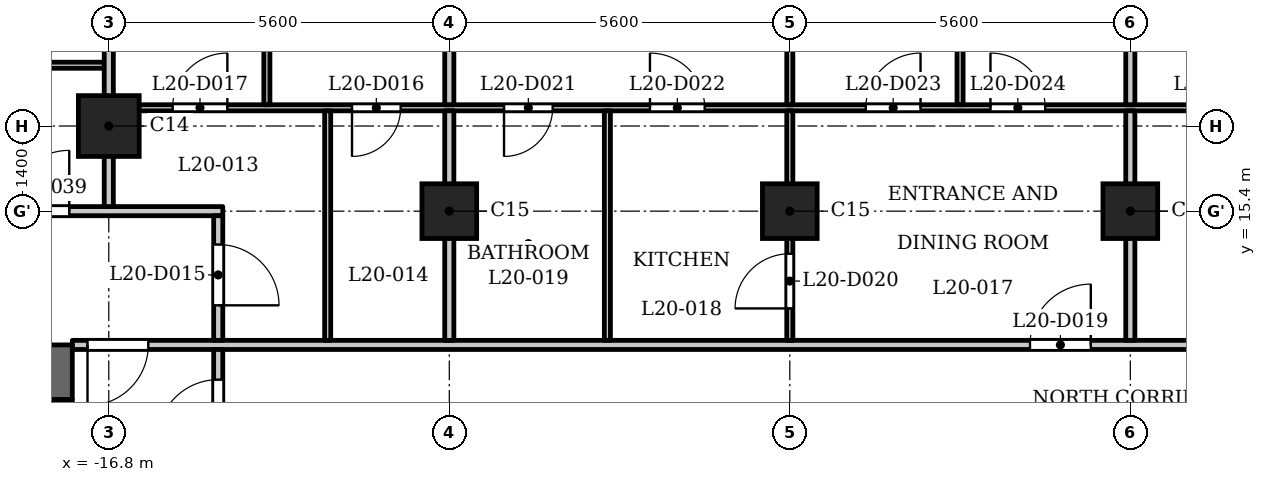
"""IFC4 building model, lengths in metres.
Left out: names, types, materials, properties, quantities, classifications, styles, units other than length and angle.
Written with IfcOpenShell. Run it as: python <this file> out.ifc"""

import sys

from ifc_helpers import new_model, si_unit, direction, frame, frame_2d, origin, origin_2d, place, context, subcontext, project, spatial, rectangle, extrude, element, fill, save


model = new_model("IFC4")
c1 = context("Model", 3, precision=1e-05, world=origin(), true_north=direction((0.0, 1.0)))
c2 = subcontext(c1, "Body", "Model", "MODEL_VIEW")
j1 = project(units=[si_unit("LENGTHUNIT", "METRE"), si_unit("PLANEANGLEUNIT", "RADIAN")], contexts=[c1])
p1 = place(None, origin())
s1 = spatial("IfcSite", under=j1, at=p1, CompositionType="ELEMENT")
p2 = place(p1, origin())
s2 = spatial("IfcBuilding", under=s1, at=p2, CompositionType="ELEMENT")
p3 = place(p2, frame((0.0, 0.0, 83.3)))
s3 = spatial("IfcBuildingStorey", under=s2, at=p3, CompositionType="ELEMENT", Elevation=83.3)
p4 = place(p3, frame((-16.8, 16.8, 0.0), z_axis=(0.0, 0.0, 1.0), x_axis=(1.0, 0.0, 0.0)))
e1 = element("IfcColumn", 1, at=p4, inside=s3, PredefinedType="COLUMN", context=c2, shape_type="SweptSolid", body=[
    extrude(rectangle(XDim=1.0, YDim=1.0, at=origin_2d()), origin(), (0.0, 0.0, 1.0), 3.5),
])
for number, where, z_axis, x_axis in (
    (2, (-11.2, 15.4, 0.0), (0.0, 0.0, 1.0), (1.0, 0.0, 0.0)),
    (3, (-5.6, 15.4, 0.0), (0.0, 0.0, 1.0), (1.0, 0.0, 0.0)),
    (4, (0.0, 15.4, 0.0), (0.0, 0.0, 1.0), (1.0, 0.0, 0.0)),
):
    element("IfcColumn", number, at=place(p3, frame(where, z_axis=z_axis, x_axis=x_axis)), inside=s3, PredefinedType="COLUMN", context=c2, shape_type="SweptSolid", body=[
        extrude(rectangle(XDim=0.9, YDim=0.9, at=origin_2d()), origin(), (0.0, 0.0, 1.0), 3.5),
    ])
p5 = place(p3, frame((-17.4, 12.75, 0.0), z_axis=(0.0, 0.0, 1.0), x_axis=(-1.0, 0.0, 0.0)))
e5 = element("IfcWall", 5, at=p5, inside=s3, PredefinedType="SHEAR", context=c2, shape_type="SweptSolid", body=[
    extrude(rectangle(XDim=10.4, YDim=0.9, at=frame_2d((5.2, 0.0))), origin(), (0.0, 0.0, 1.0), 3.2),
])
p6 = place(p3, frame((-17.6, -12.3, 0.0), z_axis=(0.0, 0.0, 1.0), x_axis=(0.0, 1.0, 0.0)))
e6 = element("IfcWall", 6, at=p6, inside=s3, PredefinedType="SHEAR", context=c2, shape_type="SweptSolid", body=[
    extrude(rectangle(XDim=24.6, YDim=0.4, at=frame_2d((12.3, 0.0))), origin(), (0.0, 0.0, 1.0), 3.2),
])
p7 = place(p6, frame((6.0, 0.0, 0.0)))
e7 = element("IfcOpeningElement", 7, at=p7, cuts=e6, PredefinedType="OPENING", context=c2, shape_type="SweptSolid", body=[
    extrude(rectangle(XDim=1.1, YDim=2.1, at=frame_2d((0.55, 1.05))), frame((0.0, 0.21, 0.0), z_axis=(0.0, -1.0, 0.0), x_axis=(1.0, 0.0, 0.0)), (0.0, 0.0, 1.0), 0.42),
])
p8 = place(p6, frame((8.4, 0.0, 0.0)))
e8 = element("IfcOpeningElement", 8, at=p8, cuts=e6, PredefinedType="OPENING", context=c2, shape_type="SweptSolid", body=[
    extrude(rectangle(XDim=1.1, YDim=2.1, at=frame_2d((0.55, 1.05))), frame((0.0, 0.21, 0.0), z_axis=(0.0, -1.0, 0.0), x_axis=(1.0, 0.0, 0.0)), (0.0, 0.0, 1.0), 0.42),
])
p9 = place(p6, frame((10.8, 0.0, 0.0)))
e9 = element("IfcOpeningElement", 9, at=p9, cuts=e6, PredefinedType="OPENING", context=c2, shape_type="SweptSolid", body=[
    extrude(rectangle(XDim=1.1, YDim=2.1, at=frame_2d((0.55, 1.05))), frame((0.0, 0.21, 0.0), z_axis=(0.0, -1.0, 0.0), x_axis=(1.0, 0.0, 0.0)), (0.0, 0.0, 1.0), 0.42),
])
p10 = place(p6, frame((16.75, 0.0, 0.0)))
e10 = element("IfcOpeningElement", 10, at=p10, cuts=e6, PredefinedType="OPENING", context=c2, shape_type="SweptSolid", body=[
    extrude(rectangle(XDim=0.9, YDim=2.1, at=frame_2d((0.45, 1.05))), frame((0.0, 0.21, 0.0), z_axis=(0.0, -1.0, 0.0), x_axis=(1.0, 0.0, 0.0)), (0.0, 0.0, 1.0), 0.42),
])
p11 = place(p6, frame((22.8, 0.0, 0.0)))
e11 = element("IfcOpeningElement", 11, at=p11, cuts=e6, PredefinedType="OPENING", context=c2, shape_type="SweptSolid", body=[
    extrude(rectangle(XDim=1.1, YDim=2.1, at=frame_2d((0.55, 1.05))), frame((0.0, 0.21, 0.0), z_axis=(0.0, -1.0, 0.0), x_axis=(1.0, 0.0, 0.0)), (0.0, 0.0, 1.0), 0.42),
])
p12 = place(p6, frame((0.7, 0.0, 0.0)))
e12 = element("IfcOpeningElement", 12, at=p12, cuts=e6, PredefinedType="OPENING", context=c2, shape_type="SweptSolid", body=[
    extrude(rectangle(XDim=1.1, YDim=2.1, at=frame_2d((0.55, 1.05))), frame((0.0, 0.21, 0.0), z_axis=(0.0, -1.0, 0.0), x_axis=(1.0, 0.0, 0.0)), (0.0, 0.0, 1.0), 0.42),
])
p13 = place(p6, frame((12.775, 0.0, 0.0)))
e13 = element("IfcOpeningElement", 13, at=p13, cuts=e6, PredefinedType="OPENING", context=c2, shape_type="SweptSolid", body=[
    extrude(rectangle(XDim=1.8, YDim=2.1, at=frame_2d((0.9, 1.05))), frame((0.0, 0.21, 0.0), z_axis=(0.0, -1.0, 0.0), x_axis=(1.0, 0.0, 0.0)), (0.0, 0.0, 1.0), 0.42),
])
p14 = place(p3, frame((-17.4, 13.2, 0.0), z_axis=(0.0, 0.0, 1.0), x_axis=(1.0, 0.0, 0.0)))
e14 = element("IfcWall", 14, at=p14, inside=s3, PredefinedType="PARTITIONING", context=c2, shape_type="SweptSolid", body=[
    extrude(rectangle(XDim=34.8, YDim=0.15, at=frame_2d((17.4, 0.0))), origin(), (0.0, 0.0, 1.0), 3.2),
])
p15 = place(p14, frame((0.25, 0.0, 0.0)))
e15 = element("IfcOpeningElement", 15, at=p15, cuts=e14, PredefinedType="OPENING", context=c2, shape_type="SweptSolid", body=[
    extrude(rectangle(XDim=1.0, YDim=2.1, at=frame_2d((0.5, 1.05))), frame((0.0, 0.085, 0.0), z_axis=(0.0, -1.0, 0.0), x_axis=(1.0, 0.0, 0.0)), (0.0, 0.0, 1.0), 0.17),
])
p16 = place(p14, frame((33.65, 0.0, 0.0)))
e16 = element("IfcOpeningElement", 16, at=p16, cuts=e14, PredefinedType="OPENING", context=c2, shape_type="SweptSolid", body=[
    extrude(rectangle(XDim=1.0, YDim=2.1, at=frame_2d((0.5, 1.05))), frame((0.0, 0.085, 0.0), z_axis=(0.0, -1.0, 0.0), x_axis=(1.0, 0.0, 0.0)), (0.0, 0.0, 1.0), 0.17),
])
p17 = place(p14, frame((15.75, 0.0, 0.0)))
e17 = element("IfcOpeningElement", 17, at=p17, cuts=e14, PredefinedType="OPENING", context=c2, shape_type="SweptSolid", body=[
    extrude(rectangle(XDim=1.0, YDim=2.1, at=frame_2d((0.5, 1.05))), frame((0.0, 0.085, 0.0), z_axis=(0.0, -1.0, 0.0), x_axis=(1.0, 0.0, 0.0)), (0.0, 0.0, 1.0), 0.17),
])
p18 = place(p14, frame((21.35, 0.0, 0.0)))
e18 = element("IfcOpeningElement", 18, at=p18, cuts=e14, PredefinedType="OPENING", context=c2, shape_type="SweptSolid", body=[
    extrude(rectangle(XDim=1.0, YDim=2.1, at=frame_2d((0.5, 1.05))), frame((0.0, 0.085, 0.0), z_axis=(0.0, -1.0, 0.0), x_axis=(1.0, 0.0, 0.0)), (0.0, 0.0, 1.0), 0.17),
])
p19 = place(p3, frame((-27.484, 15.4, 0.0), z_axis=(0.0, 0.0, 1.0), x_axis=(1.0, 0.0, 0.0)))
e19 = element("IfcWall", 19, at=p19, inside=s3, PredefinedType="PARTITIONING", context=c2, shape_type="SweptSolid", body=[
    extrude(rectangle(XDim=12.559, YDim=0.15, at=frame_2d((6.279, 0.0))), origin(), (0.0, 0.0, 1.0), 3.2),
])
p20 = place(p19, frame((9.034, 0.0, 0.0)))
e20 = element("IfcOpeningElement", 20, at=p20, cuts=e19, PredefinedType="OPENING", context=c2, shape_type="SweptSolid", body=[
    extrude(rectangle(XDim=1.0, YDim=2.1, at=frame_2d((0.5, 1.05))), frame((0.0, 0.085, 0.0), z_axis=(0.0, -1.0, 0.0), x_axis=(1.0, 0.0, 0.0)), (0.0, 0.0, 1.0), 0.17),
])
p21 = place(p3, frame((-16.725, 17.1, 0.0), z_axis=(0.0, 0.0, 1.0), x_axis=(1.0, 0.0, 0.0)))
e21 = element("IfcWall", 21, at=p21, inside=s3, PredefinedType="PARTITIONING", context=c2, shape_type="SweptSolid", body=[
    extrude(rectangle(XDim=33.45, YDim=0.1, at=frame_2d((16.725, 0.0))), origin(), (0.0, 0.0, 1.0), 3.2),
])
p22 = place(p21, frame((3.925, 0.0, 0.0)))
e22 = element("IfcOpeningElement", 22, at=p22, cuts=e21, PredefinedType="OPENING", context=c2, shape_type="SweptSolid", body=[
    extrude(rectangle(XDim=0.8, YDim=2.1, at=frame_2d((0.4, 1.05))), frame((0.0, 0.06, 0.0), z_axis=(0.0, -1.0, 0.0), x_axis=(1.0, 0.0, 0.0)), (0.0, 0.0, 1.0), 0.12),
])
p23 = place(p21, frame((0.975, 0.0, 0.0)))
e23 = element("IfcOpeningElement", 23, at=p23, cuts=e21, PredefinedType="OPENING", context=c2, shape_type="SweptSolid", body=[
    extrude(rectangle(XDim=0.9, YDim=2.1, at=frame_2d((0.45, 1.05))), frame((0.0, 0.06, 0.0), z_axis=(0.0, -1.0, 0.0), x_axis=(1.0, 0.0, 0.0)), (0.0, 0.0, 1.0), 0.12),
])
p24 = place(p21, frame((6.425, 0.0, 0.0)))
e24 = element("IfcOpeningElement", 24, at=p24, cuts=e21, PredefinedType="OPENING", context=c2, shape_type="SweptSolid", body=[
    extrude(rectangle(XDim=0.8, YDim=2.1, at=frame_2d((0.4, 1.05))), frame((0.0, 0.06, 0.0), z_axis=(0.0, -1.0, 0.0), x_axis=(1.0, 0.0, 0.0)), (0.0, 0.0, 1.0), 0.12),
])
p25 = place(p21, frame((8.825, 0.0, 0.0)))
e25 = element("IfcOpeningElement", 25, at=p25, cuts=e21, PredefinedType="OPENING", context=c2, shape_type="SweptSolid", body=[
    extrude(rectangle(XDim=0.9, YDim=2.1, at=frame_2d((0.45, 1.05))), frame((0.0, 0.06, 0.0), z_axis=(0.0, -1.0, 0.0), x_axis=(1.0, 0.0, 0.0)), (0.0, 0.0, 1.0), 0.12),
])
p26 = place(p21, frame((12.375, 0.0, 0.0)))
e26 = element("IfcOpeningElement", 26, at=p26, cuts=e21, PredefinedType="OPENING", context=c2, shape_type="SweptSolid", body=[
    extrude(rectangle(XDim=0.9, YDim=2.1, at=frame_2d((0.45, 1.05))), frame((0.0, 0.06, 0.0), z_axis=(0.0, -1.0, 0.0), x_axis=(1.0, 0.0, 0.0)), (0.0, 0.0, 1.0), 0.12),
])
p27 = place(p21, frame((14.425, 0.0, 0.0)))
e27 = element("IfcOpeningElement", 27, at=p27, cuts=e21, PredefinedType="OPENING", context=c2, shape_type="SweptSolid", body=[
    extrude(rectangle(XDim=0.9, YDim=2.1, at=frame_2d((0.45, 1.05))), frame((0.0, 0.06, 0.0), z_axis=(0.0, -1.0, 0.0), x_axis=(1.0, 0.0, 0.0)), (0.0, 0.0, 1.0), 0.12),
])
p28 = place(p21, frame((26.225, 0.0, 0.0)))
e28 = element("IfcOpeningElement", 28, at=p28, cuts=e21, PredefinedType="OPENING", context=c2, shape_type="SweptSolid", body=[
    extrude(rectangle(XDim=0.8, YDim=2.1, at=frame_2d((0.4, 1.05))), frame((0.0, 0.06, 0.0), z_axis=(0.0, -1.0, 0.0), x_axis=(1.0, 0.0, 0.0)), (0.0, 0.0, 1.0), 0.12),
])
p29 = place(p21, frame((23.025, 0.0, 0.0)))
e29 = element("IfcOpeningElement", 29, at=p29, cuts=e21, PredefinedType="OPENING", context=c2, shape_type="SweptSolid", body=[
    extrude(rectangle(XDim=0.9, YDim=2.1, at=frame_2d((0.45, 1.05))), frame((0.0, 0.06, 0.0), z_axis=(0.0, -1.0, 0.0), x_axis=(1.0, 0.0, 0.0)), (0.0, 0.0, 1.0), 0.12),
])
p30 = place(p21, frame((17.775, 0.0, 0.0)))
e30 = element("IfcOpeningElement", 30, at=p30, cuts=e21, PredefinedType="OPENING", context=c2, shape_type="SweptSolid", body=[
    extrude(rectangle(XDim=0.9, YDim=2.1, at=frame_2d((0.45, 1.05))), frame((0.0, 0.06, 0.0), z_axis=(0.0, -1.0, 0.0), x_axis=(1.0, 0.0, 0.0)), (0.0, 0.0, 1.0), 0.12),
])
p31 = place(p21, frame((20.025, 0.0, 0.0)))
e31 = element("IfcOpeningElement", 31, at=p31, cuts=e21, PredefinedType="OPENING", context=c2, shape_type="SweptSolid", body=[
    extrude(rectangle(XDim=0.9, YDim=2.1, at=frame_2d((0.45, 1.05))), frame((0.0, 0.06, 0.0), z_axis=(0.0, -1.0, 0.0), x_axis=(1.0, 0.0, 0.0)), (0.0, 0.0, 1.0), 0.12),
])
p32 = place(p21, frame((28.825, 0.0, 0.0)))
e32 = element("IfcOpeningElement", 32, at=p32, cuts=e21, PredefinedType="OPENING", context=c2, shape_type="SweptSolid", body=[
    extrude(rectangle(XDim=0.8, YDim=2.1, at=frame_2d((0.4, 1.05))), frame((0.0, 0.06, 0.0), z_axis=(0.0, -1.0, 0.0), x_axis=(1.0, 0.0, 0.0)), (0.0, 0.0, 1.0), 0.12),
])
p33 = place(p21, frame((31.975, 0.0, 0.0)))
e33 = element("IfcOpeningElement", 33, at=p33, cuts=e21, PredefinedType="OPENING", context=c2, shape_type="SweptSolid", body=[
    extrude(rectangle(XDim=0.9, YDim=2.1, at=frame_2d((0.45, 1.05))), frame((0.0, 0.06, 0.0), z_axis=(0.0, -1.0, 0.0), x_axis=(1.0, 0.0, 0.0)), (0.0, 0.0, 1.0), 0.12),
])
p34 = place(p3, frame((-26.554, 17.8, 0.0), z_axis=(0.0, 0.0, 1.0), x_axis=(1.0, 0.0, 0.0)))
e34 = element("IfcWall", 34, at=p34, inside=s3, PredefinedType="PARTITIONING", context=c2, shape_type="SweptSolid", body=[
    extrude(rectangle(XDim=9.679, YDim=0.1, at=frame_2d((4.84, 0.0))), origin(), (0.0, 0.0, 1.0), 3.2),
])
p35 = place(p34, frame((2.786, 0.0, 0.0)))
e35 = element("IfcOpeningElement", 35, at=p35, cuts=e34, PredefinedType="OPENING", context=c2, shape_type="SweptSolid", body=[
    extrude(rectangle(XDim=0.8, YDim=2.1, at=frame_2d((0.4, 1.05))), frame((0.0, 0.06, 0.0), z_axis=(0.0, -1.0, 0.0), x_axis=(1.0, 0.0, 0.0)), (0.0, 0.0, 1.0), 0.12),
])
p36 = place(p34, frame((7.204, 0.0, 0.0)))
e36 = element("IfcOpeningElement", 36, at=p36, cuts=e34, PredefinedType="OPENING", context=c2, shape_type="SweptSolid", body=[
    extrude(rectangle(XDim=0.9, YDim=2.1, at=frame_2d((0.45, 1.05))), frame((0.0, 0.06, 0.0), z_axis=(0.0, -1.0, 0.0), x_axis=(1.0, 0.0, 0.0)), (0.0, 0.0, 1.0), 0.12),
])
p37 = place(p3, frame((-16.8, 15.475, 0.0), z_axis=(0.0, 0.0, 1.0), x_axis=(0.0, 1.0, 0.0)))
e37 = element("IfcWall", 37, at=p37, inside=s3, PredefinedType="PARTITIONING", context=c2, shape_type="SweptSolid", body=[
    extrude(rectangle(XDim=7.555, YDim=0.15, at=frame_2d((3.777, 0.0))), origin(), (0.0, 0.0, 1.0), 3.2),
])
p38 = place(p3, frame((-15.0, 6.769, 0.0), z_axis=(0.0, 0.0, 1.0), x_axis=(0.0, 1.0, 0.0)))
e38 = element("IfcWall", 38, at=p38, inside=s3, PredefinedType="PARTITIONING", context=c2, shape_type="SweptSolid", body=[
    extrude(rectangle(XDim=6.356, YDim=0.15, at=frame_2d((3.178, 0.0))), origin(), (0.0, 0.0, 1.0), 3.2),
])
p39 = place(p38, frame((4.86, 0.0, 0.0)))
e39 = element("IfcOpeningElement", 39, at=p39, cuts=e38, PredefinedType="OPENING", context=c2, shape_type="SweptSolid", body=[
    extrude(rectangle(XDim=1.0, YDim=2.1, at=frame_2d((0.5, 1.05))), frame((0.0, 0.085, 0.0), z_axis=(0.0, -1.0, 0.0), x_axis=(1.0, 0.0, 0.0)), (0.0, 0.0, 1.0), 0.17),
])
p40 = place(p3, frame((-15.0, 13.275, 0.0), z_axis=(0.0, 0.0, 1.0), x_axis=(0.0, 1.0, 0.0)))
e40 = element("IfcWall", 40, at=p40, inside=s3, PredefinedType="PARTITIONING", context=c2, shape_type="SweptSolid", body=[
    extrude(rectangle(XDim=2.05, YDim=0.15, at=frame_2d((1.025, 0.0))), origin(), (0.0, 0.0, 1.0), 3.2),
])
p41 = place(p40, frame((0.576, 0.0, 0.0)))
e41 = element("IfcOpeningElement", 41, at=p41, cuts=e40, PredefinedType="OPENING", context=c2, shape_type="SweptSolid", body=[
    extrude(rectangle(XDim=1.0, YDim=2.1, at=frame_2d((0.5, 1.05))), frame((0.0, 0.085, 0.0), z_axis=(0.0, -1.0, 0.0), x_axis=(1.0, 0.0, 0.0)), (0.0, 0.0, 1.0), 0.17),
])
p42 = place(p3, frame((-14.2, 17.15, 0.0), z_axis=(0.0, 0.0, 1.0), x_axis=(0.0, 1.0, 0.0)))
e42 = element("IfcWall", 42, at=p42, inside=s3, PredefinedType="PARTITIONING", context=c2, shape_type="SweptSolid", body=[
    extrude(rectangle(XDim=4.93, YDim=0.1, at=frame_2d((2.465, 0.0))), origin(), (0.0, 0.0, 1.0), 3.2),
])
p43 = place(p42, frame((3.6, 0.0, 0.0)))
e43 = element("IfcOpeningElement", 43, at=p43, cuts=e42, PredefinedType="OPENING", context=c2, shape_type="SweptSolid", body=[
    extrude(rectangle(XDim=0.9, YDim=2.1, at=frame_2d((0.45, 1.05))), frame((0.0, 0.06, 0.0), z_axis=(0.0, -1.0, 0.0), x_axis=(1.0, 0.0, 0.0)), (0.0, 0.0, 1.0), 0.12),
])
p44 = place(p3, frame((-13.2, 13.275, 0.0), z_axis=(0.0, 0.0, 1.0), x_axis=(0.0, 1.0, 0.0)))
e44 = element("IfcWall", 44, at=p44, inside=s3, PredefinedType="PARTITIONING", context=c2, shape_type="SweptSolid", body=[
    extrude(rectangle(XDim=3.775, YDim=0.1, at=frame_2d((1.888, 0.0))), origin(), (0.0, 0.0, 1.0), 3.2),
])
p45 = place(p3, frame((-11.2, 13.275, 0.0), z_axis=(0.0, 0.0, 1.0), x_axis=(0.0, 1.0, 0.0)))
e45 = element("IfcWall", 45, at=p45, inside=s3, PredefinedType="PARTITIONING", context=c2, shape_type="SweptSolid", body=[
    extrude(rectangle(XDim=3.775, YDim=0.15, at=frame_2d((1.888, 0.0))), origin(), (0.0, 0.0, 1.0), 3.2),
])
p46 = place(p3, frame((-11.2, 17.15, 0.0), z_axis=(0.0, 0.0, 1.0), x_axis=(0.0, 1.0, 0.0)))
e46 = element("IfcWall", 46, at=p46, inside=s3, PredefinedType="PARTITIONING", context=c2, shape_type="SweptSolid", body=[
    extrude(rectangle(XDim=5.88, YDim=0.15, at=frame_2d((2.94, 0.0))), origin(), (0.0, 0.0, 1.0), 3.2),
])
p47 = place(p3, frame((-8.6, 13.275, 0.0), z_axis=(0.0, 0.0, 1.0), x_axis=(0.0, 1.0, 0.0)))
e47 = element("IfcWall", 47, at=p47, inside=s3, PredefinedType="PARTITIONING", context=c2, shape_type="SweptSolid", body=[
    extrude(rectangle(XDim=3.775, YDim=0.1, at=frame_2d((1.888, 0.0))), origin(), (0.0, 0.0, 1.0), 3.2),
])
p48 = place(p3, frame((-5.6, 13.275, 0.0), z_axis=(0.0, 0.0, 1.0), x_axis=(0.0, 1.0, 0.0)))
e48 = element("IfcWall", 48, at=p48, inside=s3, PredefinedType="PARTITIONING", context=c2, shape_type="SweptSolid", body=[
    extrude(rectangle(XDim=3.775, YDim=0.1, at=frame_2d((1.888, 0.0))), origin(), (0.0, 0.0, 1.0), 3.2),
])
p49 = place(p48, frame((0.525, 0.0, 0.0)))
e49 = element("IfcOpeningElement", 49, at=p49, cuts=e48, PredefinedType="OPENING", context=c2, shape_type="SweptSolid", body=[
    extrude(rectangle(XDim=0.9, YDim=2.1, at=frame_2d((0.45, 1.05))), frame((0.0, 0.06, 0.0), z_axis=(0.0, -1.0, 0.0), x_axis=(1.0, 0.0, 0.0)), (0.0, 0.0, 1.0), 0.12),
])
p50 = place(p3, frame((-5.6, 17.15, 0.0), z_axis=(0.0, 0.0, 1.0), x_axis=(0.0, 1.0, 0.0)))
e50 = element("IfcWall", 50, at=p50, inside=s3, PredefinedType="PARTITIONING", context=c2, shape_type="SweptSolid", body=[
    extrude(rectangle(XDim=5.88, YDim=0.1, at=frame_2d((2.94, 0.0))), origin(), (0.0, 0.0, 1.0), 3.2),
])
p51 = place(p3, frame((-2.8, 17.15, 0.0), z_axis=(0.0, 0.0, 1.0), x_axis=(0.0, 1.0, 0.0)))
e51 = element("IfcWall", 51, at=p51, inside=s3, PredefinedType="PARTITIONING", context=c2, shape_type="SweptSolid", body=[
    extrude(rectangle(XDim=4.93, YDim=0.1, at=frame_2d((2.465, 0.0))), origin(), (0.0, 0.0, 1.0), 3.2),
])
p52 = place(p3, frame((0.0, 13.275, 0.0), z_axis=(0.0, 0.0, 1.0), x_axis=(0.0, 1.0, 0.0)))
e52 = element("IfcWall", 52, at=p52, inside=s3, PredefinedType="PARTITIONING", context=c2, shape_type="SweptSolid", body=[
    extrude(rectangle(XDim=3.775, YDim=0.15, at=frame_2d((1.888, 0.0))), origin(), (0.0, 0.0, 1.0), 3.2),
])
p53 = place(p3, frame((0.0, 17.15, 0.0), z_axis=(0.0, 0.0, 1.0), x_axis=(0.0, 1.0, 0.0)))
e53 = element("IfcWall", 53, at=p53, inside=s3, PredefinedType="PARTITIONING", context=c2, shape_type="SweptSolid", body=[
    extrude(rectangle(XDim=5.88, YDim=0.15, at=frame_2d((2.94, 0.0))), origin(), (0.0, 0.0, 1.0), 3.2),
])
p54 = place(p39, origin())
e54 = element("IfcDoor", 54, at=p54, inside=s3, OperationType="SINGLE_SWING_RIGHT", PredefinedType="DOOR", context=c2, shape_type="SweptSolid", body=[
    extrude(rectangle(XDim=1.0, YDim=2.1, at=frame_2d((0.5, 1.05))), frame((0.0, 0.025, 0.0), z_axis=(0.0, -1.0, 0.0), x_axis=(1.0, 0.0, 0.0)), (0.0, 0.0, 1.0), 0.05),
])
fill(e39, e54)
p55 = place(p15, origin())
e55 = element("IfcDoor", 55, at=p55, inside=s3, OperationType="SINGLE_SWING_LEFT", PredefinedType="DOOR", context=c2, shape_type="SweptSolid", body=[
    extrude(rectangle(XDim=1.0, YDim=2.1, at=frame_2d((0.5, 1.05))), frame((0.0, 0.025, 0.0), z_axis=(0.0, -1.0, 0.0), x_axis=(1.0, 0.0, 0.0)), (0.0, 0.0, 1.0), 0.05),
])
fill(e15, e55)
p56 = place(p41, origin())
e56 = element("IfcDoor", 56, at=p56, inside=s3, OperationType="SINGLE_SWING_LEFT", PredefinedType="DOOR", context=c2, shape_type="SweptSolid", body=[
    extrude(rectangle(XDim=1.0, YDim=2.1, at=frame_2d((0.5, 1.05))), frame((0.0, 0.025, 0.0), z_axis=(0.0, -1.0, 0.0), x_axis=(1.0, 0.0, 0.0)), (0.0, 0.0, 1.0), 0.05),
])
fill(e41, e56)
p57 = place(p22, origin())
e57 = element("IfcDoor", 57, at=p57, inside=s3, OperationType="SINGLE_SWING_LEFT", PredefinedType="DOOR", context=c2, shape_type="SweptSolid", body=[
    extrude(rectangle(XDim=0.8, YDim=2.1, at=frame_2d((0.4, 1.05))), frame((0.0, 0.025, 0.0), z_axis=(0.0, -1.0, 0.0), x_axis=(1.0, 0.0, 0.0)), (0.0, 0.0, 1.0), 0.05),
])
fill(e22, e57)
p58 = place(p23, origin())
e58 = element("IfcDoor", 58, at=p58, inside=s3, OperationType="SINGLE_SWING_LEFT", PredefinedType="DOOR", context=c2, shape_type="SweptSolid", body=[
    extrude(rectangle(XDim=0.9, YDim=2.1, at=frame_2d((0.45, 1.05))), frame((0.0, 0.025, 0.0), z_axis=(0.0, -1.0, 0.0), x_axis=(1.0, 0.0, 0.0)), (0.0, 0.0, 1.0), 0.05),
])
fill(e23, e58)
p59 = place(p17, origin())
e59 = element("IfcDoor", 59, at=p59, inside=s3, OperationType="SINGLE_SWING_LEFT", PredefinedType="DOOR", context=c2, shape_type="SweptSolid", body=[
    extrude(rectangle(XDim=1.0, YDim=2.1, at=frame_2d((0.5, 1.05))), frame((0.0, 0.025, 0.0), z_axis=(0.0, -1.0, 0.0), x_axis=(1.0, 0.0, 0.0)), (0.0, 0.0, 1.0), 0.05),
])
fill(e17, e59)
p60 = place(p49, origin())
e60 = element("IfcDoor", 60, at=p60, inside=s3, OperationType="SINGLE_SWING_RIGHT", PredefinedType="DOOR", context=c2, shape_type="SweptSolid", body=[
    extrude(rectangle(XDim=0.9, YDim=2.1, at=frame_2d((0.45, 1.05))), frame((0.0, 0.025, 0.0), z_axis=(0.0, -1.0, 0.0), x_axis=(1.0, 0.0, 0.0)), (0.0, 0.0, 1.0), 0.05),
])
fill(e49, e60)
p61 = place(p24, origin())
e61 = element("IfcDoor", 61, at=p61, inside=s3, OperationType="SINGLE_SWING_LEFT", PredefinedType="DOOR", context=c2, shape_type="SweptSolid", body=[
    extrude(rectangle(XDim=0.8, YDim=2.1, at=frame_2d((0.4, 1.05))), frame((0.0, 0.025, 0.0), z_axis=(0.0, -1.0, 0.0), x_axis=(1.0, 0.0, 0.0)), (0.0, 0.0, 1.0), 0.05),
])
fill(e24, e61)
p62 = place(p25, origin())
e62 = element("IfcDoor", 62, at=p62, inside=s3, OperationType="SINGLE_SWING_RIGHT", PredefinedType="DOOR", context=c2, shape_type="SweptSolid", body=[
    extrude(rectangle(XDim=0.9, YDim=2.1, at=frame_2d((0.45, 1.05))), frame((0.0, 0.025, 0.0), z_axis=(0.0, -1.0, 0.0), x_axis=(1.0, 0.0, 0.0)), (0.0, 0.0, 1.0), 0.05),
])
fill(e25, e62)
p63 = place(p26, origin())
e63 = element("IfcDoor", 63, at=p63, inside=s3, OperationType="SINGLE_SWING_LEFT", PredefinedType="DOOR", context=c2, shape_type="SweptSolid", body=[
    extrude(rectangle(XDim=0.9, YDim=2.1, at=frame_2d((0.45, 1.05))), frame((0.0, 0.025, 0.0), z_axis=(0.0, -1.0, 0.0), x_axis=(1.0, 0.0, 0.0)), (0.0, 0.0, 1.0), 0.05),
])
fill(e26, e63)
p64 = place(p27, origin())
e64 = element("IfcDoor", 64, at=p64, inside=s3, OperationType="SINGLE_SWING_RIGHT", PredefinedType="DOOR", context=c2, shape_type="SweptSolid", body=[
    extrude(rectangle(XDim=0.9, YDim=2.1, at=frame_2d((0.45, 1.05))), frame((0.0, 0.025, 0.0), z_axis=(0.0, -1.0, 0.0), x_axis=(1.0, 0.0, 0.0)), (0.0, 0.0, 1.0), 0.05),
])
fill(e27, e64)
p65 = place(p20, origin())
e65 = element("IfcDoor", 65, at=p65, inside=s3, OperationType="SINGLE_SWING_LEFT", PredefinedType="DOOR", context=c2, shape_type="SweptSolid", body=[
    extrude(rectangle(XDim=1.0, YDim=2.1, at=frame_2d((0.5, 1.05))), frame((0.0, 0.025, 0.0), z_axis=(0.0, -1.0, 0.0), x_axis=(1.0, 0.0, 0.0)), (0.0, 0.0, 1.0), 0.05),
])
fill(e20, e65)
save(model, sys.argv[1])
